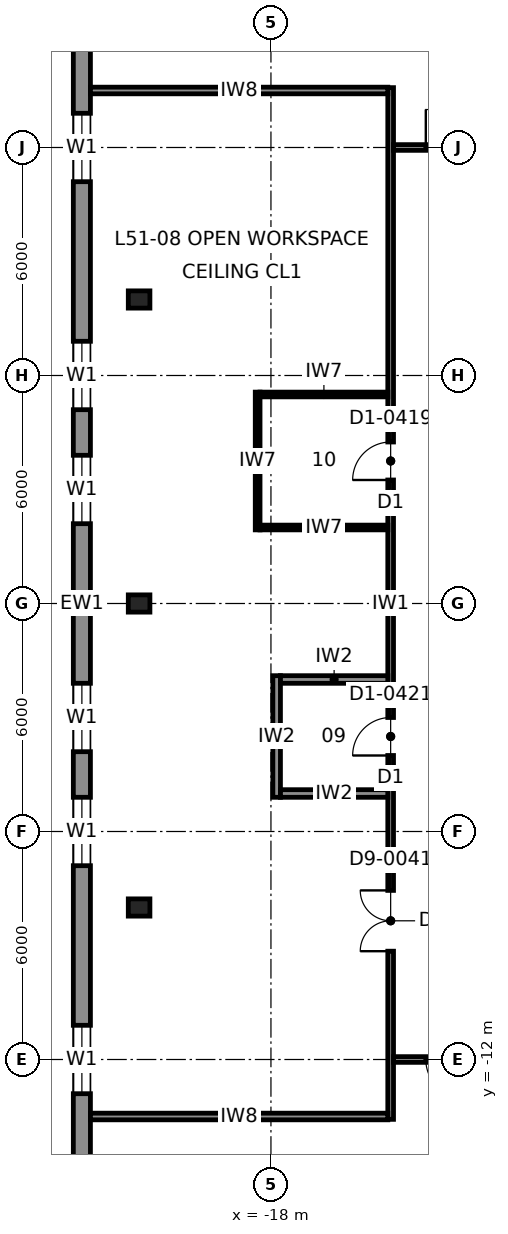
"""IFC4 building model, lengths in metres.
Left out: names, types, materials, properties, quantities, classifications, styles, units other than length and angle.
Written with IfcOpenShell. Run it as: python <this file> out.ifc"""

import sys

from ifc_helpers import new_model, si_unit, direction, frame, frame_2d, origin, origin_2d, place, context, subcontext, project, spatial, rectangle, i_section, extrude, element, fill, save


model = new_model("IFC4")
c1 = context("Model", 3, precision=1e-05, world=origin(), true_north=direction((0.0, 1.0)))
c2 = subcontext(c1, "Body", "Model", "MODEL_VIEW")
j1 = project(units=[si_unit("LENGTHUNIT", "METRE"), si_unit("PLANEANGLEUNIT", "RADIAN")], contexts=[c1])
p1 = place(None, origin())
s1 = spatial("IfcSite", under=j1, at=p1, CompositionType="ELEMENT")
p2 = place(p1, origin())
s2 = spatial("IfcBuilding", under=s1, at=p2, CompositionType="ELEMENT")
p3 = place(p2, frame((0.0, 0.0, 233.8)))
s3 = spatial("IfcBuildingStorey", under=s2, at=p3, CompositionType="ELEMENT", Elevation=233.8)
for number, where, z_axis, x_axis in (
    (1, (-21.469, 0.0, 0.0), (0.04, 0.0, 0.999), (0.0, 1.0, 0.0)),
    (2, (-21.469, 8.0, 0.0), (0.04, 0.0, 0.999), (0.0, 1.0, 0.0)),
    (3, (-21.469, -8.0, 0.0), (0.04, 0.0, 0.999), (0.0, 1.0, 0.0)),
):
    element("IfcColumn", number, at=place(p3, frame(where, z_axis=z_axis, x_axis=x_axis)), inside=s3, PredefinedType="COLUMN", context=c2, shape_type="SweptSolid", body=[
        extrude(i_section(OverallWidth=0.454, OverallDepth=0.569, WebThickness=0.078, FlangeThickness=0.125, at=origin_2d()), origin(), (0.0, 0.0, 1.0), 4.003),
    ])
p4 = place(p3, frame((-22.975, 18.7, 0.0), z_axis=(0.0, 0.0, 1.0), x_axis=(0.0, -1.0, 0.0)))
e4 = element("IfcWall", 4, at=p4, inside=s3, PredefinedType="SOLIDWALL", context=c2, shape_type="SweptSolid", body=[
    extrude(rectangle(XDim=37.4, YDim=0.45, at=frame_2d((18.7, 0.0))), origin(), (0.0, 0.0, 1.0), 3.83),
])
p5 = place(p4, frame((5.8, 0.0, 0.7)))
e5 = element("IfcOpeningElement", 5, at=p5, cuts=e4, PredefinedType="OPENING", context=c2, shape_type="SweptSolid", body=[
    extrude(rectangle(XDim=1.8, YDim=2.6, at=frame_2d((0.9, 1.3))), frame((0.0, 0.235, 0.0), z_axis=(0.0, -1.0, 0.0), x_axis=(1.0, 0.0, 0.0)), (0.0, 0.0, 1.0), 0.47),
])
p6 = place(p4, frame((11.8, 0.0, 0.7)))
e6 = element("IfcOpeningElement", 6, at=p6, cuts=e4, PredefinedType="OPENING", context=c2, shape_type="SweptSolid", body=[
    extrude(rectangle(XDim=1.8, YDim=2.6, at=frame_2d((0.9, 1.3))), frame((0.0, 0.235, 0.0), z_axis=(0.0, -1.0, 0.0), x_axis=(1.0, 0.0, 0.0)), (0.0, 0.0, 1.0), 0.47),
])
p7 = place(p4, frame((14.8, 0.0, 0.7)))
e7 = element("IfcOpeningElement", 7, at=p7, cuts=e4, PredefinedType="OPENING", context=c2, shape_type="SweptSolid", body=[
    extrude(rectangle(XDim=1.8, YDim=2.6, at=frame_2d((0.9, 1.3))), frame((0.0, 0.235, 0.0), z_axis=(0.0, -1.0, 0.0), x_axis=(1.0, 0.0, 0.0)), (0.0, 0.0, 1.0), 0.47),
])
p8 = place(p4, frame((20.8, 0.0, 0.7)))
e8 = element("IfcOpeningElement", 8, at=p8, cuts=e4, PredefinedType="OPENING", context=c2, shape_type="SweptSolid", body=[
    extrude(rectangle(XDim=1.8, YDim=2.6, at=frame_2d((0.9, 1.3))), frame((0.0, 0.235, 0.0), z_axis=(0.0, -1.0, 0.0), x_axis=(1.0, 0.0, 0.0)), (0.0, 0.0, 1.0), 0.47),
])
p9 = place(p4, frame((23.8, 0.0, 0.7)))
e9 = element("IfcOpeningElement", 9, at=p9, cuts=e4, PredefinedType="OPENING", context=c2, shape_type="SweptSolid", body=[
    extrude(rectangle(XDim=1.8, YDim=2.6, at=frame_2d((0.9, 1.3))), frame((0.0, 0.235, 0.0), z_axis=(0.0, -1.0, 0.0), x_axis=(1.0, 0.0, 0.0)), (0.0, 0.0, 1.0), 0.47),
])
p10 = place(p4, frame((29.8, 0.0, 0.7)))
e10 = element("IfcOpeningElement", 10, at=p10, cuts=e4, PredefinedType="OPENING", context=c2, shape_type="SweptSolid", body=[
    extrude(rectangle(XDim=1.8, YDim=2.6, at=frame_2d((0.9, 1.3))), frame((0.0, 0.235, 0.0), z_axis=(0.0, -1.0, 0.0), x_axis=(1.0, 0.0, 0.0)), (0.0, 0.0, 1.0), 0.47),
])
p11 = place(p3, frame((-14.85, 13.575, 0.0), z_axis=(0.0, 0.0, 1.0), x_axis=(0.0, -1.0, 0.0)))
e11 = element("IfcWall", 11, at=p11, inside=s3, PredefinedType="PARTITIONING", context=c2, shape_type="SweptSolid", body=[
    extrude(rectangle(XDim=27.15, YDim=0.15, at=frame_2d((13.575, 0.0))), origin(), (0.0, 0.0, 1.0), 3.83),
])
p12 = place(p11, frame((21.125, 0.0, 0.0)))
e12 = element("IfcOpeningElement", 12, at=p12, cuts=e11, PredefinedType="OPENING", context=c2, shape_type="SweptSolid", body=[
    extrude(rectangle(XDim=1.6, YDim=2.3, at=frame_2d((0.8, 1.15))), frame((0.0, 0.085, 0.0), z_axis=(0.0, -1.0, 0.0), x_axis=(1.0, 0.0, 0.0)), (0.0, 0.0, 1.0), 0.17),
])
p13 = place(p11, frame((16.575, 0.0, 0.0)))
e13 = element("IfcOpeningElement", 13, at=p13, cuts=e11, PredefinedType="OPENING", context=c2, shape_type="SweptSolid", body=[
    extrude(rectangle(XDim=1.0, YDim=2.3, at=frame_2d((0.5, 1.15))), frame((0.0, 0.085, 0.0), z_axis=(0.0, -1.0, 0.0), x_axis=(1.0, 0.0, 0.0)), (0.0, 0.0, 1.0), 0.17),
])
p14 = place(p11, frame((9.325, 0.0, 0.0)))
e14 = element("IfcOpeningElement", 14, at=p14, cuts=e11, PredefinedType="OPENING", context=c2, shape_type="SweptSolid", body=[
    extrude(rectangle(XDim=1.0, YDim=2.3, at=frame_2d((0.5, 1.15))), frame((0.0, 0.085, 0.0), z_axis=(0.0, -1.0, 0.0), x_axis=(1.0, 0.0, 0.0)), (0.0, 0.0, 1.0), 0.17),
])
p15 = place(p3, frame((-14.775, 12.0, 0.0), z_axis=(0.0, 0.0, 1.0), x_axis=(1.0, 0.0, 0.0)))
e15 = element("IfcWall", 15, at=p15, inside=s3, PredefinedType="PARTITIONING", context=c2, shape_type="SweptSolid", body=[
    extrude(rectangle(XDim=2.775, YDim=0.15, at=frame_2d((1.387, 0.0))), origin(), (0.0, 0.0, 1.0), 3.83),
])
p16 = place(p15, frame((0.85, 0.0, 0.0)))
e16 = element("IfcOpeningElement", 16, at=p16, cuts=e15, PredefinedType="OPENING", context=c2, shape_type="SweptSolid", body=[
    extrude(rectangle(XDim=1.0, YDim=2.3, at=frame_2d((0.5, 1.15))), frame((0.0, 0.085, 0.0), z_axis=(0.0, -1.0, 0.0), x_axis=(1.0, 0.0, 0.0)), (0.0, 0.0, 1.0), 0.17),
])
p17 = place(p3, frame((-12.0, -12.0, 0.0), z_axis=(0.0, 0.0, 1.0), x_axis=(-1.0, 0.0, 0.0)))
e17 = element("IfcWall", 17, at=p17, inside=s3, PredefinedType="PARTITIONING", context=c2, shape_type="SweptSolid", body=[
    extrude(rectangle(XDim=2.775, YDim=0.15, at=frame_2d((1.387, 0.0))), origin(), (0.0, 0.0, 1.0), 3.83),
])
p18 = place(p17, frame((0.925, 0.0, 0.0)))
e18 = element("IfcOpeningElement", 18, at=p18, cuts=e17, PredefinedType="OPENING", context=c2, shape_type="SweptSolid", body=[
    extrude(rectangle(XDim=1.0, YDim=2.3, at=frame_2d((0.5, 1.15))), frame((0.0, 0.085, 0.0), z_axis=(0.0, -1.0, 0.0), x_axis=(1.0, 0.0, 0.0)), (0.0, 0.0, 1.0), 0.17),
])
for number, where, z_axis, x_axis in (
    (19, (-22.75, 13.5, 0.0), (0.0, 0.0, 1.0), (1.0, 0.0, 0.0)),
    (20, (-14.925, -13.5, 0.0), (0.0, 0.0, 1.0), (-1.0, 0.0, 0.0)),
):
    element("IfcWall", number, at=place(p3, frame(where, z_axis=z_axis, x_axis=x_axis)), inside=s3, PredefinedType="PARTITIONING", context=c2, shape_type="SweptSolid", body=[
        extrude(rectangle(XDim=7.825, YDim=0.175, at=frame_2d((3.913, 0.0))), origin(), (0.0, 0.0, 1.0), 3.83),
    ])
p19 = place(p3, frame((-17.85, -5.1, 0.0), z_axis=(0.0, 0.0, 1.0), x_axis=(0.0, 1.0, 0.0)))
e21 = element("IfcWall", 21, at=p19, inside=s3, PredefinedType="PARTITIONING", context=c2, shape_type="SweptSolid", body=[
    extrude(rectangle(XDim=3.2, YDim=0.2, at=frame_2d((1.6, 0.0))), origin(), (0.0, 0.0, 1.0), 3.83),
])
for number, where, z_axis, x_axis in (
    (22, (-14.925, -5.0, 0.0), (0.0, 0.0, 1.0), (-1.0, 0.0, 0.0)),
    (23, (-14.925, -2.0, 0.0), (0.0, 0.0, 1.0), (-1.0, 0.0, 0.0)),
):
    element("IfcWall", number, at=place(p3, frame(where, z_axis=z_axis, x_axis=x_axis)), inside=s3, PredefinedType="PARTITIONING", context=c2, shape_type="SweptSolid", body=[
        extrude(rectangle(XDim=2.825, YDim=0.2, at=frame_2d((1.413, 0.0))), origin(), (0.0, 0.0, 1.0), 3.83),
    ])
p20 = place(p3, frame((-18.35, 1.938, 0.0), z_axis=(0.0, 0.0, 1.0), x_axis=(0.0, 1.0, 0.0)))
e24 = element("IfcWall", 24, at=p20, inside=s3, PredefinedType="PARTITIONING", context=c2, shape_type="SweptSolid", body=[
    extrude(rectangle(XDim=3.625, YDim=0.125, at=frame_2d((1.812, 0.0))), origin(), (0.0, 0.0, 1.0), 3.83),
])
for number, where, z_axis, x_axis in (
    (25, (-14.925, 2.0, 0.0), (0.0, 0.0, 1.0), (-1.0, 0.0, 0.0)),
    (26, (-14.925, 5.5, 0.0), (0.0, 0.0, 1.0), (-1.0, 0.0, 0.0)),
):
    element("IfcWall", number, at=place(p3, frame(where, z_axis=z_axis, x_axis=x_axis)), inside=s3, PredefinedType="PARTITIONING", context=c2, shape_type="SweptSolid", body=[
        extrude(rectangle(XDim=3.363, YDim=0.125, at=frame_2d((1.681, 0.0))), origin(), (0.0, 0.0, 1.0), 3.83),
    ])
p21 = place(p5, origin())
e27 = element("IfcWindow", 27, at=p21, inside=s3, PartitioningType="SINGLE_PANEL", PredefinedType="WINDOW", context=c2, shape_type="SweptSolid", body=[
    extrude(rectangle(XDim=1.8, YDim=2.6, at=frame_2d((0.9, 1.3))), frame((0.0, 0.03, 0.0), z_axis=(0.0, -1.0, 0.0), x_axis=(1.0, 0.0, 0.0)), (0.0, 0.0, 1.0), 0.06),
])
fill(e5, e27)
p22 = place(p6, origin())
e28 = element("IfcWindow", 28, at=p22, inside=s3, PartitioningType="SINGLE_PANEL", PredefinedType="WINDOW", context=c2, shape_type="SweptSolid", body=[
    extrude(rectangle(XDim=1.8, YDim=2.6, at=frame_2d((0.9, 1.3))), frame((0.0, 0.03, 0.0), z_axis=(0.0, -1.0, 0.0), x_axis=(1.0, 0.0, 0.0)), (0.0, 0.0, 1.0), 0.06),
])
fill(e6, e28)
p23 = place(p7, origin())
e29 = element("IfcWindow", 29, at=p23, inside=s3, PartitioningType="SINGLE_PANEL", PredefinedType="WINDOW", context=c2, shape_type="SweptSolid", body=[
    extrude(rectangle(XDim=1.8, YDim=2.6, at=frame_2d((0.9, 1.3))), frame((0.0, 0.03, 0.0), z_axis=(0.0, -1.0, 0.0), x_axis=(1.0, 0.0, 0.0)), (0.0, 0.0, 1.0), 0.06),
])
fill(e7, e29)
p24 = place(p8, origin())
e30 = element("IfcWindow", 30, at=p24, inside=s3, PartitioningType="SINGLE_PANEL", PredefinedType="WINDOW", context=c2, shape_type="SweptSolid", body=[
    extrude(rectangle(XDim=1.8, YDim=2.6, at=frame_2d((0.9, 1.3))), frame((0.0, 0.03, 0.0), z_axis=(0.0, -1.0, 0.0), x_axis=(1.0, 0.0, 0.0)), (0.0, 0.0, 1.0), 0.06),
])
fill(e8, e30)
p25 = place(p9, origin())
e31 = element("IfcWindow", 31, at=p25, inside=s3, PartitioningType="SINGLE_PANEL", PredefinedType="WINDOW", context=c2, shape_type="SweptSolid", body=[
    extrude(rectangle(XDim=1.8, YDim=2.6, at=frame_2d((0.9, 1.3))), frame((0.0, 0.03, 0.0), z_axis=(0.0, -1.0, 0.0), x_axis=(1.0, 0.0, 0.0)), (0.0, 0.0, 1.0), 0.06),
])
fill(e9, e31)
p26 = place(p10, origin())
e32 = element("IfcWindow", 32, at=p26, inside=s3, PartitioningType="SINGLE_PANEL", PredefinedType="WINDOW", context=c2, shape_type="SweptSolid", body=[
    extrude(rectangle(XDim=1.8, YDim=2.6, at=frame_2d((0.9, 1.3))), frame((0.0, 0.03, 0.0), z_axis=(0.0, -1.0, 0.0), x_axis=(1.0, 0.0, 0.0)), (0.0, 0.0, 1.0), 0.06),
])
fill(e10, e32)
p27 = place(p16, origin())
e33 = element("IfcDoor", 33, at=p27, inside=s3, OperationType="SINGLE_SWING_LEFT", PredefinedType="DOOR", context=c2, shape_type="SweptSolid", body=[
    extrude(rectangle(XDim=1.0, YDim=2.3, at=frame_2d((0.5, 1.15))), frame((0.0, 0.025, 0.0), z_axis=(0.0, -1.0, 0.0), x_axis=(1.0, 0.0, 0.0)), (0.0, 0.0, 1.0), 0.05),
])
fill(e16, e33)
p28 = place(p18, origin())
e34 = element("IfcDoor", 34, at=p28, inside=s3, OperationType="SINGLE_SWING_LEFT", PredefinedType="DOOR", context=c2, shape_type="SweptSolid", body=[
    extrude(rectangle(XDim=1.0, YDim=2.3, at=frame_2d((0.5, 1.15))), frame((0.0, 0.025, 0.0), z_axis=(0.0, -1.0, 0.0), x_axis=(1.0, 0.0, 0.0)), (0.0, 0.0, 1.0), 0.05),
])
fill(e18, e34)
p29 = place(p12, frame((1.6, 0.0, 0.0), z_axis=(0.0, 0.0, 1.0), x_axis=(-1.0, 0.0, 0.0)))
e35 = element("IfcDoor", 35, at=p29, inside=s3, OperationType="DOUBLE_DOOR_SINGLE_SWING", PredefinedType="DOOR", context=c2, shape_type="SweptSolid", body=[
    extrude(rectangle(XDim=1.6, YDim=2.3, at=frame_2d((0.8, 1.15))), frame((0.0, 0.025, 0.0), z_axis=(0.0, -1.0, 0.0), x_axis=(1.0, 0.0, 0.0)), (0.0, 0.0, 1.0), 0.05),
])
fill(e12, e35)
p30 = place(p13, frame((1.0, 0.0, 0.0), z_axis=(0.0, 0.0, 1.0), x_axis=(-1.0, 0.0, 0.0)))
e36 = element("IfcDoor", 36, at=p30, inside=s3, OperationType="SINGLE_SWING_LEFT", PredefinedType="DOOR", context=c2, shape_type="SweptSolid", body=[
    extrude(rectangle(XDim=1.0, YDim=2.3, at=frame_2d((0.5, 1.15))), frame((0.0, 0.025, 0.0), z_axis=(0.0, -1.0, 0.0), x_axis=(1.0, 0.0, 0.0)), (0.0, 0.0, 1.0), 0.05),
])
fill(e13, e36)
p31 = place(p14, frame((1.0, 0.0, 0.0), z_axis=(0.0, 0.0, 1.0), x_axis=(-1.0, 0.0, 0.0)))
e37 = element("IfcDoor", 37, at=p31, inside=s3, OperationType="SINGLE_SWING_LEFT", PredefinedType="DOOR", context=c2, shape_type="SweptSolid", body=[
    extrude(rectangle(XDim=1.0, YDim=2.3, at=frame_2d((0.5, 1.15))), frame((0.0, 0.025, 0.0), z_axis=(0.0, -1.0, 0.0), x_axis=(1.0, 0.0, 0.0)), (0.0, 0.0, 1.0), 0.05),
])
fill(e14, e37)
save(model, sys.argv[1])
